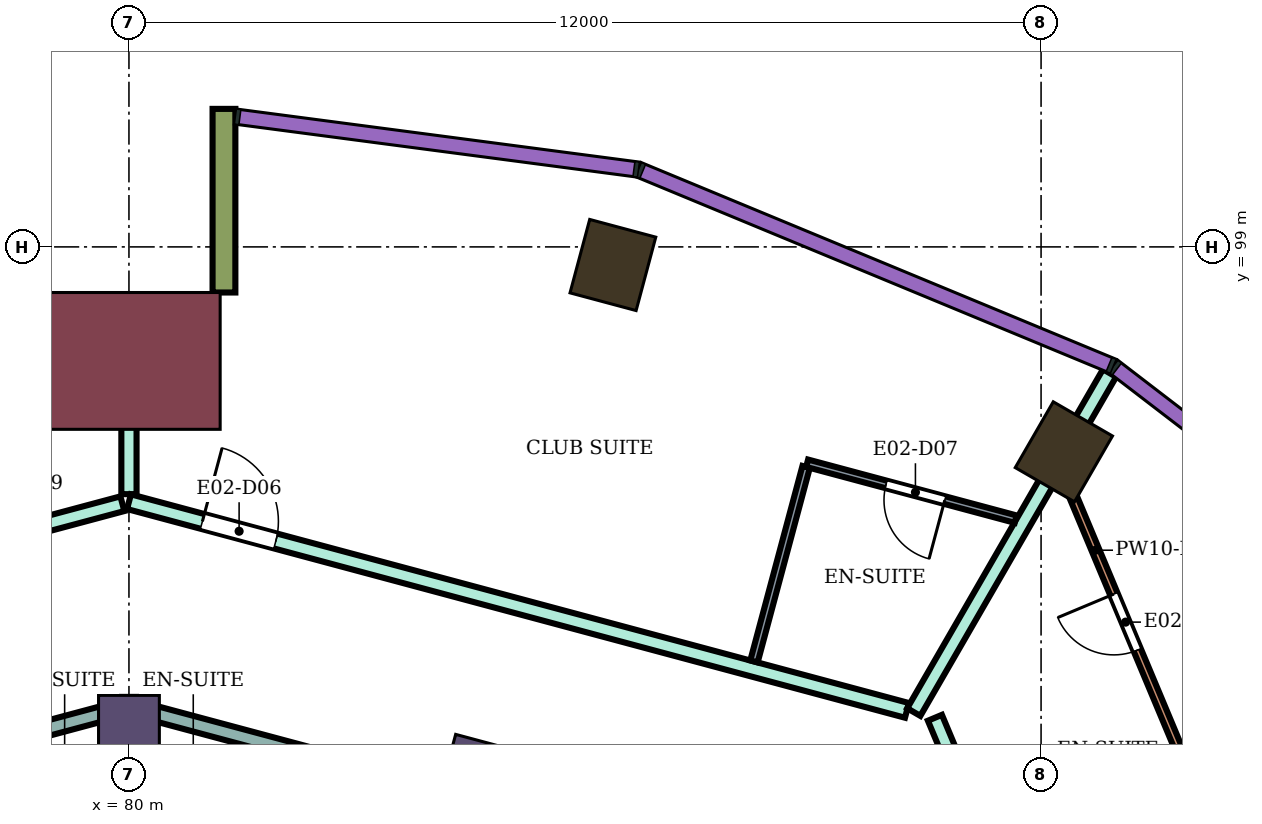
"""IFC4 building model, lengths in metres.
Left out: names, types, materials, properties, quantities, classifications, styles, units other than length and angle.
Written with IfcOpenShell. Run it as: python <this file> out.ifc"""

import sys

from ifc_helpers import new_model, si_unit, direction, frame, frame_2d, origin, origin_2d, place, context, subcontext, project, spatial, rectangle, extrude, element, fill, save


model = new_model("IFC4")
c1 = context("Model", 3, precision=1e-05, world=origin(), true_north=direction((0.0, 1.0)))
c2 = subcontext(c1, "Body", "Model", "MODEL_VIEW")
j1 = project(units=[si_unit("LENGTHUNIT", "METRE"), si_unit("PLANEANGLEUNIT", "RADIAN")], contexts=[c1])
p1 = place(None, origin())
s1 = spatial("IfcSite", under=j1, at=p1, CompositionType="ELEMENT")
p2 = place(p1, origin())
s2 = spatial("IfcBuilding", under=s1, at=p2, CompositionType="ELEMENT")
p3 = place(p2, frame((0.0, 0.0, 126.3)))
s3 = spatial("IfcBuildingStorey", under=s2, at=p3, CompositionType="ELEMENT", Elevation=126.3)
for number, where, z_axis, x_axis in (
    (1, (92.3, 96.304, 0.0), (0.0, 0.0, 1.0), (0.5, 0.866, 0.0)),
    (2, (86.367, 98.762, 0.0), (0.0, 0.0, 1.0), (0.259, 0.966, 0.0)),
):
    element("IfcColumn", number, at=place(p3, frame(where, z_axis=z_axis, x_axis=x_axis)), inside=s3, PredefinedType="COLUMN", context=c2, shape_type="SweptSolid", body=[
        extrude(rectangle(XDim=1.0, YDim=0.9, at=origin_2d()), origin(), (0.0, 0.0, 1.0), 3.9),
    ])
for number, where, z_axis, x_axis in (
    (3, (84.555, 92.0, 0.0), (0.0, 0.0, 1.0), (0.259, 0.966, 0.0)),
    (4, (80.0, 92.6, 0.0), (0.0, 0.0, 1.0), (0.0, 1.0, 0.0)),
):
    element("IfcColumn", number, at=place(p3, frame(where, z_axis=z_axis, x_axis=x_axis)), inside=s3, PredefinedType="COLUMN", context=c2, shape_type="SweptSolid", body=[
        extrude(rectangle(XDim=1.0, YDim=0.8, at=origin_2d()), origin(), (0.0, 0.0, 1.0), 3.9),
    ])
p4 = place(p3, frame((80.0, 97.5, 0.0), z_axis=(0.0, 0.0, 1.0), x_axis=(0.0, 1.0, 0.0)))
e5 = element("IfcColumn", 5, at=p4, inside=s3, PredefinedType="COLUMN", context=c2, shape_type="SweptSolid", body=[
    extrude(rectangle(XDim=1.8, YDim=2.4, at=origin_2d()), origin(), (0.0, 0.0, 1.0), 3.9),
])
p5 = place(p3, frame((81.25, 98.4, 0.0), z_axis=(0.0, 0.0, 1.0), x_axis=(0.0, 1.0, 0.0)))
e6 = element("IfcWall", 6, at=p5, inside=s3, PredefinedType="NOTDEFINED", context=c2, shape_type="SweptSolid", body=[
    extrude(rectangle(XDim=2.416, YDim=0.3, at=frame_2d((1.208, 0.0))), origin(), (0.0, 0.0, 1.0), 3.9),
])
p6 = place(p3, frame((69.397, 92.805, 0.0), z_axis=(0.0, 0.0, 1.0), x_axis=(0.965971666602, 0.258647906087, 0.0)))
e7 = element("IfcWall", 7, at=p6, inside=s3, PredefinedType="PARTITIONING", context=c2, shape_type="SweptSolid", body=[
    extrude(rectangle(XDim=10.887, YDim=0.2, at=frame_2d((5.443, 0.0))), origin(), (0.0, 0.0, 1.0), 3.45),
])
p7 = place(p6, frame((6.163, 0.0, 0.0)))
e8 = element("IfcOpeningElement", 8, at=p7, cuts=e7, PredefinedType="OPENING", context=c2, shape_type="SweptSolid", body=[
    extrude(rectangle(XDim=1.0, YDim=2.1, at=frame_2d((0.5, 1.05))), frame((0.0, 0.11, 0.0), z_axis=(0.0, -1.0, 0.0), x_axis=(1.0, 0.0, 0.0)), (0.0, 0.0, 1.0), 0.22),
])
p8 = place(p6, frame((2.461, 0.0, 0.0)))
e9 = element("IfcOpeningElement", 9, at=p8, cuts=e7, PredefinedType="OPENING", context=c2, shape_type="SweptSolid", body=[
    extrude(rectangle(XDim=1.0, YDim=2.1, at=frame_2d((0.5, 1.05))), frame((0.0, 0.11, 0.0), z_axis=(0.0, -1.0, 0.0), x_axis=(1.0, 0.0, 0.0)), (0.0, 0.0, 1.0), 0.22),
])
p9 = place(p3, frame((71.303, 90.625, 0.0), z_axis=(0.0, 0.0, 1.0), x_axis=(0.965971868307, 0.258647152776, 0.0)))
e10 = element("IfcWall", 10, at=p9, inside=s3, PredefinedType="PARTITIONING", context=c2, shape_type="SweptSolid", body=[
    extrude(rectangle(XDim=8.874, YDim=0.2, at=frame_2d((4.437, 0.0))), origin(), (0.0, 0.0, 1.0), 3.08),
])
p10 = place(p9, frame((0.55, 0.0, 0.0)))
e11 = element("IfcOpeningElement", 11, at=p10, cuts=e10, PredefinedType="OPENING", context=c2, shape_type="SweptSolid", body=[
    extrude(rectangle(XDim=1.0, YDim=2.1, at=frame_2d((0.5, 1.05))), frame((0.0, 0.11, 0.0), z_axis=(0.0, -1.0, 0.0), x_axis=(1.0, 0.0, 0.0)), (0.0, 0.0, 1.0), 0.22),
])
p11 = place(p3, frame((80.0, 82.699, 0.0), z_axis=(0.0, 0.0, 1.0), x_axis=(0.0, 1.0, 0.0)))
e12 = element("IfcWall", 12, at=p11, inside=s3, PredefinedType="PARTITIONING", context=c2, shape_type="SweptSolid", body=[
    extrude(rectangle(XDim=10.125, YDim=0.2, at=frame_2d((5.062, 0.0))), origin(), (0.0, 0.0, 1.0), 3.45),
])
p12 = place(p3, frame((80.0, 92.954, 0.0), z_axis=(0.0, 0.0, 1.0), x_axis=(0.96592536278, -0.258820774936, 0.0)))
e13 = element("IfcWall", 13, at=p12, inside=s3, PredefinedType="PARTITIONING", context=c2, shape_type="SweptSolid", body=[
    extrude(rectangle(XDim=8.934, YDim=0.2, at=frame_2d((4.467, 0.0))), origin(), (0.0, 0.0, 1.0), 3.08),
])
p13 = place(p12, frame((7.454, 0.0, 0.0)))
e14 = element("IfcOpeningElement", 14, at=p13, cuts=e13, PredefinedType="OPENING", context=c2, shape_type="SweptSolid", body=[
    extrude(rectangle(XDim=1.0, YDim=2.1, at=frame_2d((0.5, 1.05))), frame((0.0, 0.11, 0.0), z_axis=(0.0, -1.0, 0.0), x_axis=(1.0, 0.0, 0.0)), (0.0, 0.0, 1.0), 0.22),
])
p14 = place(p3, frame((80.0, 95.747, 0.0), z_axis=(0.0, 0.0, 1.0), x_axis=(0.0, 1.0, 0.0)))
e15 = element("IfcWall", 15, at=p14, inside=s3, PredefinedType="PARTITIONING", context=c2, shape_type="SweptSolid", body=[
    extrude(rectangle(XDim=2.452, YDim=0.2, at=frame_2d((1.226, 0.0))), origin(), (0.0, 0.0, 1.0), 3.45),
])
p15 = place(p3, frame((80.0, 95.648, 0.0), z_axis=(0.0, 0.0, 1.0), x_axis=(0.965852259202, -0.259093445292, 0.0)))
e16 = element("IfcWall", 16, at=p15, inside=s3, PredefinedType="PARTITIONING", context=c2, shape_type="SweptSolid", body=[
    extrude(rectangle(XDim=10.597, YDim=0.2, at=frame_2d((5.298, 0.0))), origin(), (0.0, 0.0, 1.0), 3.45),
])
p16 = place(p15, frame((1.0, 0.0, 0.0)))
e17 = element("IfcOpeningElement", 17, at=p16, cuts=e16, PredefinedType="OPENING", context=c2, shape_type="SweptSolid", body=[
    extrude(rectangle(XDim=1.0, YDim=2.1, at=frame_2d((0.5, 1.05))), frame((0.0, 0.11, 0.0), z_axis=(0.0, -1.0, 0.0), x_axis=(1.0, 0.0, 0.0)), (0.0, 0.0, 1.0), 0.22),
])
p17 = place(p3, frame((90.325, 92.88, 0.0), z_axis=(0.0, 0.0, 1.0), x_axis=(0.500084891114, 0.865976386329, 0.0)))
e18 = element("IfcWall", 18, at=p17, inside=s3, PredefinedType="PARTITIONING", context=c2, shape_type="SweptSolid", body=[
    extrude(rectangle(XDim=5.15, YDim=0.2, at=frame_2d((2.575, 0.0))), origin(), (0.0, 0.0, 1.0), 3.45),
])
p18 = place(p3, frame((90.604, 92.805, 0.0), z_axis=(0.0, 0.0, 1.0), x_axis=(0.386199042801, -0.922415470024, 0.0)))
e19 = element("IfcWall", 19, at=p18, inside=s3, PredefinedType="PARTITIONING", context=c2, shape_type="SweptSolid", body=[
    extrude(rectangle(XDim=8.48, YDim=0.2, at=frame_2d((4.24, 0.0))), origin(), (0.0, 0.0, 1.0), 3.45),
])
p19 = place(p18, frame((3.823, 0.0, 0.0)))
e20 = element("IfcOpeningElement", 20, at=p19, cuts=e19, PredefinedType="OPENING", context=c2, shape_type="SweptSolid", body=[
    extrude(rectangle(XDim=1.0, YDim=2.1, at=frame_2d((0.5, 1.05))), frame((0.0, 0.11, 0.0), z_axis=(0.0, -1.0, 0.0), x_axis=(1.0, 0.0, 0.0)), (0.0, 0.0, 1.0), 0.22),
])
p20 = place(p3, frame((88.223, 93.547, 0.0), z_axis=(0.0, 0.0, 1.0), x_axis=(0.259021640683, 0.965871518194, 0.0)))
e21 = element("IfcWall", 21, at=p20, inside=s3, PredefinedType="PARTITIONING", context=c2, shape_type="SweptSolid", body=[
    extrude(rectangle(XDim=2.649, YDim=0.1, at=frame_2d((1.325, 0.0))), origin(), (0.0, 0.0, 1.0), 3.45),
])
p21 = place(p3, frame((88.922, 96.154, 0.0), z_axis=(0.0, 0.0, 1.0), x_axis=(0.965887418767, -0.258962341408, 0.0)))
e22 = element("IfcWall", 22, at=p21, inside=s3, PredefinedType="PARTITIONING", context=c2, shape_type="SweptSolid", body=[
    extrude(rectangle(XDim=2.841, YDim=0.1, at=frame_2d((1.42, 0.0))), origin(), (0.0, 0.0, 1.0), 3.45),
])
p22 = place(p21, frame((1.075, 0.0, 0.0)))
e23 = element("IfcOpeningElement", 23, at=p22, cuts=e22, PredefinedType="OPENING", context=c2, shape_type="SweptSolid", body=[
    extrude(rectangle(XDim=0.8, YDim=2.1, at=frame_2d((0.4, 1.05))), frame((0.0, 0.06, 0.0), z_axis=(0.0, -1.0, 0.0), x_axis=(1.0, 0.0, 0.0)), (0.0, 0.0, 1.0), 0.12),
])
p23 = place(p3, frame((92.289, 96.03, 0.0), z_axis=(0.0, 0.0, 1.0), x_axis=(0.386237487323, -0.922399373041, 0.0)))
e24 = element("IfcWall", 24, at=p23, inside=s3, PredefinedType="PARTITIONING", context=c2, shape_type="SweptSolid", body=[
    extrude(rectangle(XDim=4.423, YDim=0.1, at=frame_2d((2.211, 0.0))), origin(), (0.0, 0.0, 1.0), 2.68),
])
p24 = place(p23, frame((1.731, 0.0, 0.0)))
e25 = element("IfcOpeningElement", 25, at=p24, cuts=e24, PredefinedType="OPENING", context=c2, shape_type="SweptSolid", body=[
    extrude(rectangle(XDim=0.8, YDim=2.1, at=frame_2d((0.4, 1.05))), frame((0.0, 0.06, 0.0), z_axis=(0.0, -1.0, 0.0), x_axis=(1.0, 0.0, 0.0)), (0.0, 0.0, 1.0), 0.12),
])
p25 = place(p24, frame((0.8, 0.0, 0.0), z_axis=(0.0, 0.0, 1.0), x_axis=(-1.0, 0.0, 0.0)))
e26 = element("IfcDoor", 26, at=p25, inside=s3, OperationType="SINGLE_SWING_RIGHT", PredefinedType="DOOR", context=c2, shape_type="SweptSolid", body=[
    extrude(rectangle(XDim=0.8, YDim=2.1, at=frame_2d((0.4, 1.05))), frame((0.0, 0.025, 0.0), z_axis=(0.0, -1.0, 0.0), x_axis=(1.0, 0.0, 0.0)), (0.0, 0.0, 1.0), 0.05),
])
fill(e25, e26)
p26 = place(p16, origin())
e27 = element("IfcDoor", 27, at=p26, inside=s3, OperationType="SINGLE_SWING_LEFT", PredefinedType="DOOR", context=c2, shape_type="SweptSolid", body=[
    extrude(rectangle(XDim=1.0, YDim=2.1, at=frame_2d((0.5, 1.05))), frame((0.0, 0.025, 0.0), z_axis=(0.0, -1.0, 0.0), x_axis=(1.0, 0.0, 0.0)), (0.0, 0.0, 1.0), 0.05),
])
fill(e17, e27)
p27 = place(p22, frame((0.8, 0.0, 0.0), z_axis=(0.0, 0.0, 1.0), x_axis=(-1.0, 0.0, 0.0)))
e28 = element("IfcDoor", 28, at=p27, inside=s3, OperationType="SINGLE_SWING_LEFT", PredefinedType="DOOR", context=c2, shape_type="SweptSolid", body=[
    extrude(rectangle(XDim=0.8, YDim=2.1, at=frame_2d((0.4, 1.05))), frame((0.0, 0.025, 0.0), z_axis=(0.0, -1.0, 0.0), x_axis=(1.0, 0.0, 0.0)), (0.0, 0.0, 1.0), 0.05),
])
fill(e23, e28)
save(model, sys.argv[1])
